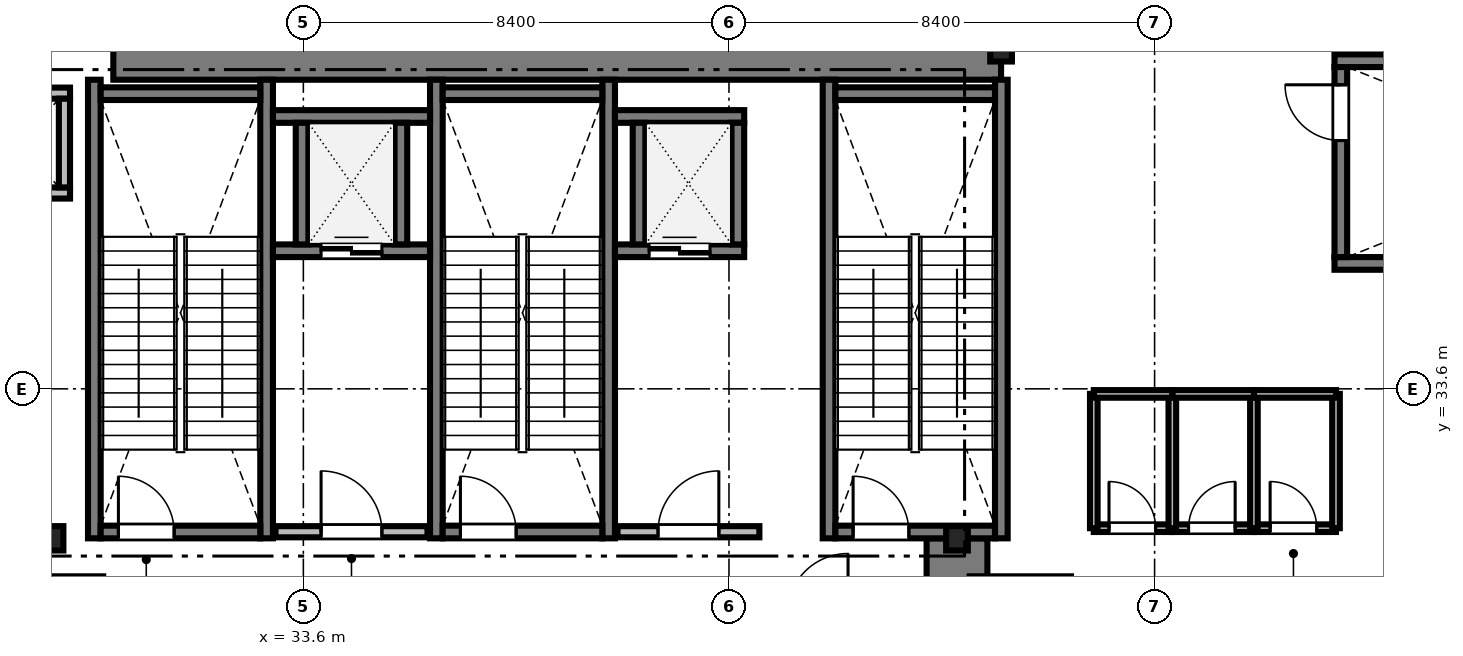
"""IFC4 building model, lengths in metres.
Left out: names, types, materials, properties, quantities, classifications, styles, units other than length and angle.
Written with IfcOpenShell. Run it as: python <this file> out.ifc"""

import sys

from ifc_helpers import new_model, si_unit, direction, frame, frame_2d, origin, origin_2d, place, context, subcontext, project, spatial, rectangle, i_section, extrude, source, transform, mapped, element, fill, save


model = new_model("IFC4")
c1 = context("Model", 3, precision=1e-05, world=origin(), true_north=direction((0.0, 1.0)))
c2 = subcontext(c1, "Body", "Model", "MODEL_VIEW")
j1 = project(units=[si_unit("LENGTHUNIT", "METRE"), si_unit("PLANEANGLEUNIT", "RADIAN")], contexts=[c1])
p1 = place(None, origin())
s1 = spatial("IfcSite", under=j1, at=p1, CompositionType="ELEMENT")
p2 = place(p1, origin())
s2 = spatial("IfcBuilding", under=s1, at=p2, CompositionType="ELEMENT")
p3 = place(p2, frame((0.0, 0.0, 11.4)))
s3 = spatial("IfcBuildingStorey", under=s2, at=p3, CompositionType="ELEMENT", Elevation=11.4)
m1 = source(origin(), c2, "Body", "SweptSolid", [
    extrude(rectangle(XDim=17.52, YDim=1.2, at=frame_2d((8.76, 0.0))), origin(), (0.0, 0.0, 1.0), 5.2),
])
p4 = place(p3, frame((29.85, 40.3, 0.0), z_axis=(0.0, 0.0, 1.0), x_axis=(1.0, 0.0, 0.0)))
e1 = element("IfcWall", 1, at=p4, inside=s3, PredefinedType="SHEAR", context=c2, shape_type="MappedRepresentation", body=[
    mapped(m1, transform((0.0, 0.0, 0.0), scale=1.0)),
])
m2 = source(origin(), c2, "Body", "SweptSolid", [
    extrude(rectangle(XDim=13.15, YDim=1.2, at=frame_2d((6.575, 0.0))), origin(), (0.0, 0.0, 1.0), 5.2),
])
p5 = place(p3, frame((46.5, 17.5, 0.0), z_axis=(0.0, 0.0, 1.0), x_axis=(0.0, 1.0, 0.0)))
e2 = element("IfcWall", 2, at=p5, inside=s3, PredefinedType="SHEAR", context=c2, shape_type="MappedRepresentation", body=[
    mapped(m2, transform((0.0, 0.0, 0.0), scale=1.0)),
])
m3 = source(origin(), c2, "Body", "SweptSolid", [
    extrude(i_section(OverallWidth=0.428, OverallDepth=0.481, WebThickness=0.04, FlangeThickness=0.063, FilletRadius=0.015, at=origin_2d()), origin(), (0.0, 0.0, 1.0), 5.2),
])
for number, where, z_axis, x_axis in (
    (3, (28.65, 30.65, 0.0), (0.0, 0.0, 1.0), (1.0, 0.0, 0.0)),
    (4, (46.5, 30.65, 0.0), (0.0, 0.0, 1.0), (1.0, 0.0, 0.0)),
    (5, (47.37, 40.3, 0.0), (0.0, 0.0, 1.0), (1.0, 0.0, 0.0)),
):
    element("IfcColumn", number, at=place(p3, frame(where, z_axis=z_axis, x_axis=x_axis)), inside=s3, PredefinedType="COLUMN", context=c2, shape_type="MappedRepresentation", body=[
        mapped(m3, transform((0.0, 0.0, 0.0), scale=1.0)),
    ])
m4 = source(origin(), c2, "Body", "SweptSolid", [
    extrude(rectangle(XDim=9.05, YDim=0.25, at=frame_2d((4.525, 0.0))), origin(), (0.0, 0.0, 1.0), 5.4),
])
for number, where, z_axis, x_axis in (
    (6, (29.475, 30.65, 0.0), (0.0, 0.0, 1.0), (0.0, 1.0, 0.0)),
    (7, (32.875, 30.65, 0.0), (0.0, 0.0, 1.0), (0.0, 1.0, 0.0)),
):
    element("IfcWall", number, at=place(p3, frame(where, z_axis=z_axis, x_axis=x_axis)), inside=s3, PredefinedType="SOLIDWALL", context=c2, shape_type="MappedRepresentation", body=[
        mapped(m4, transform((0.0, 0.0, 0.0), scale=1.0)),
    ])
m5 = source(origin(), c2, "Body", "SweptSolid", [
    extrude(rectangle(XDim=3.15, YDim=0.25, at=frame_2d((1.575, 0.0))), origin(), (0.0, 0.0, 1.0), 5.4),
])
p6 = place(p3, frame((29.6, 39.425, 0.0), z_axis=(0.0, 0.0, 1.0), x_axis=(1.0, 0.0, 0.0)))
e8 = element("IfcWall", 8, at=p6, inside=s3, PredefinedType="SOLIDWALL", context=c2, shape_type="MappedRepresentation", body=[
    mapped(m5, transform((0.0, 0.0, 0.0), scale=1.0)),
])
p7 = place(p3, frame((29.6, 30.775, 0.0), z_axis=(0.0, 0.0, 1.0), x_axis=(1.0, 0.0, 0.0)))
e9 = element("IfcWall", 9, at=p7, inside=s3, PredefinedType="SOLIDWALL", context=c2, shape_type="MappedRepresentation", body=[
    mapped(m5, transform((0.0, 0.0, 0.0), scale=1.0)),
])
m6 = source(origin(), c2, "Body", "SweptSolid", [
    extrude(rectangle(XDim=1.1, YDim=2.2, at=frame_2d((0.55, 1.1))), frame((0.0, 0.135, 0.0), z_axis=(0.0, -1.0, 0.0), x_axis=(1.0, 0.0, 0.0)), (0.0, 0.0, 1.0), 0.27),
])
p8 = place(p7, frame((0.35, 0.0, 0.0)))
e10 = element("IfcOpeningElement", 10, at=p8, cuts=e9, PredefinedType="OPENING", context=c2, shape_type="MappedRepresentation", body=[
    mapped(m6, transform((0.0, 0.0, 0.0), scale=1.0)),
])
for number, where, z_axis, x_axis in (
    (11, (36.225, 30.65, 0.0), (0.0, 0.0, 1.0), (0.0, 1.0, 0.0)),
    (12, (39.625, 30.65, 0.0), (0.0, 0.0, 1.0), (0.0, 1.0, 0.0)),
):
    element("IfcWall", number, at=place(p3, frame(where, z_axis=z_axis, x_axis=x_axis)), inside=s3, PredefinedType="SOLIDWALL", context=c2, shape_type="MappedRepresentation", body=[
        mapped(m4, transform((0.0, 0.0, 0.0), scale=1.0)),
    ])
p9 = place(p3, frame((36.35, 39.425, 0.0), z_axis=(0.0, 0.0, 1.0), x_axis=(1.0, 0.0, 0.0)))
e13 = element("IfcWall", 13, at=p9, inside=s3, PredefinedType="SOLIDWALL", context=c2, shape_type="MappedRepresentation", body=[
    mapped(m5, transform((0.0, 0.0, 0.0), scale=1.0)),
])
p10 = place(p3, frame((36.35, 30.775, 0.0), z_axis=(0.0, 0.0, 1.0), x_axis=(1.0, 0.0, 0.0)))
e14 = element("IfcWall", 14, at=p10, inside=s3, PredefinedType="SOLIDWALL", context=c2, shape_type="MappedRepresentation", body=[
    mapped(m5, transform((0.0, 0.0, 0.0), scale=1.0)),
])
p11 = place(p10, frame((0.35, 0.0, 0.0)))
e15 = element("IfcOpeningElement", 15, at=p11, cuts=e14, PredefinedType="OPENING", context=c2, shape_type="MappedRepresentation", body=[
    mapped(m6, transform((0.0, 0.0, 0.0), scale=1.0)),
])
for number, where, z_axis, x_axis in (
    (16, (43.975, 30.65, 0.0), (0.0, 0.0, 1.0), (0.0, 1.0, 0.0)),
    (17, (47.375, 30.65, 0.0), (0.0, 0.0, 1.0), (0.0, 1.0, 0.0)),
):
    element("IfcWall", number, at=place(p3, frame(where, z_axis=z_axis, x_axis=x_axis)), inside=s3, PredefinedType="SOLIDWALL", context=c2, shape_type="MappedRepresentation", body=[
        mapped(m4, transform((0.0, 0.0, 0.0), scale=1.0)),
    ])
p12 = place(p3, frame((44.1, 39.425, 0.0), z_axis=(0.0, 0.0, 1.0), x_axis=(1.0, 0.0, 0.0)))
e18 = element("IfcWall", 18, at=p12, inside=s3, PredefinedType="SOLIDWALL", context=c2, shape_type="MappedRepresentation", body=[
    mapped(m5, transform((0.0, 0.0, 0.0), scale=1.0)),
])
p13 = place(p3, frame((44.1, 30.775, 0.0), z_axis=(0.0, 0.0, 1.0), x_axis=(1.0, 0.0, 0.0)))
e19 = element("IfcWall", 19, at=p13, inside=s3, PredefinedType="SOLIDWALL", context=c2, shape_type="MappedRepresentation", body=[
    mapped(m5, transform((0.0, 0.0, 0.0), scale=1.0)),
])
p14 = place(p13, frame((0.35, 0.0, 0.0)))
e20 = element("IfcOpeningElement", 20, at=p14, cuts=e19, PredefinedType="OPENING", context=c2, shape_type="MappedRepresentation", body=[
    mapped(m6, transform((0.0, 0.0, 0.0), scale=1.0)),
])
m7 = source(origin(), c2, "Body", "SweptSolid", [
    extrude(rectangle(XDim=9.9, YDim=0.25, at=frame_2d((4.95, 0.0))), origin(), (0.0, 0.0, 1.0), 5.4),
])
for number, where, z_axis, x_axis in (
    (21, (53.95, 36.075, 0.0), (0.0, 0.0, 1.0), (1.0, 0.0, 0.0)),
    (22, (53.95, 40.075, 0.0), (0.0, 0.0, 1.0), (1.0, 0.0, 0.0)),
):
    element("IfcWall", number, at=place(p3, frame(where, z_axis=z_axis, x_axis=x_axis)), inside=s3, PredefinedType="SOLIDWALL", context=c2, shape_type="MappedRepresentation", body=[
        mapped(m7, transform((0.0, 0.0, 0.0), scale=1.0)),
    ])
m8 = source(origin(), c2, "Body", "SweptSolid", [
    extrude(rectangle(XDim=3.75, YDim=0.25, at=frame_2d((1.875, 0.0))), origin(), (0.0, 0.0, 1.0), 5.4),
])
p15 = place(p3, frame((54.075, 36.2, 0.0), z_axis=(0.0, 0.0, 1.0), x_axis=(0.0, 1.0, 0.0)))
e23 = element("IfcWall", 23, at=p15, inside=s3, PredefinedType="SOLIDWALL", context=c2, shape_type="MappedRepresentation", body=[
    mapped(m8, transform((0.0, 0.0, 0.0), scale=1.0)),
])
p16 = place(p15, frame((2.3, 0.0, 0.0)))
e24 = element("IfcOpeningElement", 24, at=p16, cuts=e23, PredefinedType="OPENING", context=c2, shape_type="MappedRepresentation", body=[
    mapped(m6, transform((0.0, 0.0, 0.0), scale=1.0)),
])
m9 = source(origin(), c2, "Body", "SweptSolid", [
    extrude(rectangle(XDim=3.0, YDim=0.22, at=frame_2d((1.5, 0.0))), origin(), (0.0, 0.0, 1.0), 5.2),
])
p17 = place(p3, frame((33.05, 30.78, 0.0), z_axis=(0.0, 0.0, 1.0), x_axis=(1.0, 0.0, 0.0)))
e25 = element("IfcWall", 25, at=p17, inside=s3, PredefinedType="SOLIDWALL", context=c2, shape_type="MappedRepresentation", body=[
    mapped(m9, transform((0.0, 0.0, 0.0), scale=1.0)),
])
m10 = source(origin(), c2, "Body", "SweptSolid", [
    extrude(rectangle(XDim=1.2, YDim=2.2, at=frame_2d((0.6, 1.1))), frame((0.0, 0.12, 0.0), z_axis=(0.0, -1.0, 0.0), x_axis=(1.0, 0.0, 0.0)), (0.0, 0.0, 1.0), 0.24),
])
p18 = place(p17, frame((0.9, 0.0, 0.0)))
e26 = element("IfcOpeningElement", 26, at=p18, cuts=e25, PredefinedType="OPENING", context=c2, shape_type="MappedRepresentation", body=[
    mapped(m10, transform((0.0, 0.0, 0.0), scale=1.0)),
])
m11 = source(origin(), c2, "Body", "SweptSolid", [
    extrude(rectangle(XDim=2.8, YDim=0.22, at=frame_2d((1.4, 0.0))), origin(), (0.0, 0.0, 1.0), 5.2),
])
p19 = place(p3, frame((39.8, 30.78, 0.0), z_axis=(0.0, 0.0, 1.0), x_axis=(1.0, 0.0, 0.0)))
e27 = element("IfcWall", 27, at=p19, inside=s3, PredefinedType="SOLIDWALL", context=c2, shape_type="MappedRepresentation", body=[
    mapped(m11, transform((0.0, 0.0, 0.0), scale=1.0)),
])
p20 = place(p19, frame((0.8, 0.0, 0.0)))
e28 = element("IfcOpeningElement", 28, at=p20, cuts=e27, PredefinedType="OPENING", context=c2, shape_type="MappedRepresentation", body=[
    mapped(m10, transform((0.0, 0.0, 0.0), scale=1.0)),
])
m12 = source(origin(), c2, "Body", "SweptSolid", [
    extrude(rectangle(XDim=1.99, YDim=0.22, at=frame_2d((0.995, 0.0))), origin(), (0.0, 0.0, 1.0), 5.2),
])
for number, where, z_axis, x_axis in (
    (29, (27.005, 37.465, 0.0), (0.0, 0.0, 1.0), (1.0, 0.0, 0.0)),
    (30, (27.005, 39.435, 0.0), (0.0, 0.0, 1.0), (1.0, 0.0, 0.0)),
):
    element("IfcWall", number, at=place(p3, frame(where, z_axis=z_axis, x_axis=x_axis)), inside=s3, PredefinedType="SOLIDWALL", context=c2, shape_type="MappedRepresentation", body=[
        mapped(m12, transform((0.0, 0.0, 0.0), scale=1.0)),
    ])
m13 = source(origin(), c2, "Body", "SweptSolid", [
    extrude(rectangle(XDim=1.75, YDim=0.22, at=frame_2d((0.875, 0.0))), origin(), (0.0, 0.0, 1.0), 5.2),
])
p21 = place(p3, frame((28.885, 37.575, 0.0), z_axis=(0.0, 0.0, 1.0), x_axis=(0.0, 1.0, 0.0)))
e31 = element("IfcWall", 31, at=p21, inside=s3, PredefinedType="SOLIDWALL", context=c2, shape_type="MappedRepresentation", body=[
    mapped(m13, transform((0.0, 0.0, 0.0), scale=1.0)),
])
m14 = source(origin(), c2, "Body", "SweptSolid", [
    extrude(rectangle(XDim=3.1, YDim=0.25, at=frame_2d((1.55, 0.0))), origin(), (0.0, 0.0, 1.0), 5.2),
])
p22 = place(p3, frame((33.0, 36.325, 0.0), z_axis=(0.0, 0.0, 1.0), x_axis=(1.0, 0.0, 0.0)))
e32 = element("IfcWall", 32, at=p22, inside=s3, PredefinedType="SOLIDWALL", context=c2, shape_type="MappedRepresentation", body=[
    mapped(m14, transform((0.0, 0.0, 0.0), scale=1.0)),
])
m15 = source(origin(), c2, "Body", "SweptSolid", [
    extrude(rectangle(XDim=1.2, YDim=2.25, at=frame_2d((0.6, 1.125))), frame((0.0, 0.135, 0.0), z_axis=(0.0, -1.0, 0.0), x_axis=(1.0, 0.0, 0.0)), (0.0, 0.0, 1.0), 0.27),
])
p23 = place(p22, frame((0.95, 0.0, 0.0)))
e33 = element("IfcOpeningElement", 33, at=p23, cuts=e32, PredefinedType="OPENING", context=c2, shape_type="MappedRepresentation", body=[
    mapped(m15, transform((0.0, 0.0, 0.0), scale=1.0)),
])
p24 = place(p3, frame((33.0, 38.975, 0.0), z_axis=(0.0, 0.0, 1.0), x_axis=(1.0, 0.0, 0.0)))
e34 = element("IfcWall", 34, at=p24, inside=s3, PredefinedType="SOLIDWALL", context=c2, shape_type="MappedRepresentation", body=[
    mapped(m14, transform((0.0, 0.0, 0.0), scale=1.0)),
])
m16 = source(origin(), c2, "Body", "SweptSolid", [
    extrude(rectangle(XDim=2.4, YDim=0.25, at=frame_2d((1.2, 0.0))), origin(), (0.0, 0.0, 1.0), 5.2),
])
for number, where, z_axis, x_axis in (
    (35, (33.575, 36.45, 0.0), (0.0, 0.0, 1.0), (0.0, 1.0, 0.0)),
    (36, (35.525, 36.45, 0.0), (0.0, 0.0, 1.0), (0.0, 1.0, 0.0)),
):
    element("IfcWall", number, at=place(p3, frame(where, z_axis=z_axis, x_axis=x_axis)), inside=s3, PredefinedType="SOLIDWALL", context=c2, shape_type="MappedRepresentation", body=[
        mapped(m16, transform((0.0, 0.0, 0.0), scale=1.0)),
    ])
m17 = source(origin(), c2, "Body", "SweptSolid", [
    extrude(rectangle(XDim=2.55, YDim=0.25, at=frame_2d((1.275, 0.0))), origin(), (0.0, 0.0, 1.0), 5.2),
])
p25 = place(p3, frame((39.75, 36.325, 0.0), z_axis=(0.0, 0.0, 1.0), x_axis=(1.0, 0.0, 0.0)))
e37 = element("IfcWall", 37, at=p25, inside=s3, PredefinedType="SOLIDWALL", context=c2, shape_type="MappedRepresentation", body=[
    mapped(m17, transform((0.0, 0.0, 0.0), scale=1.0)),
])
p26 = place(p25, frame((0.675, 0.0, 0.0)))
e38 = element("IfcOpeningElement", 38, at=p26, cuts=e37, PredefinedType="OPENING", context=c2, shape_type="MappedRepresentation", body=[
    mapped(m15, transform((0.0, 0.0, 0.0), scale=1.0)),
])
p27 = place(p3, frame((39.75, 38.975, 0.0), z_axis=(0.0, 0.0, 1.0), x_axis=(1.0, 0.0, 0.0)))
e39 = element("IfcWall", 39, at=p27, inside=s3, PredefinedType="SOLIDWALL", context=c2, shape_type="MappedRepresentation", body=[
    mapped(m17, transform((0.0, 0.0, 0.0), scale=1.0)),
])
for number, where, z_axis, x_axis in (
    (40, (40.225, 36.45, 0.0), (0.0, 0.0, 1.0), (0.0, 1.0, 0.0)),
    (41, (42.175, 36.45, 0.0), (0.0, 0.0, 1.0), (0.0, 1.0, 0.0)),
):
    element("IfcWall", number, at=place(p3, frame(where, z_axis=z_axis, x_axis=x_axis)), inside=s3, PredefinedType="SOLIDWALL", context=c2, shape_type="MappedRepresentation", body=[
        mapped(m16, transform((0.0, 0.0, 0.0), scale=1.0)),
    ])
m18 = source(origin(), c2, "Body", "SweptSolid", [
    extrude(rectangle(XDim=1.62, YDim=0.15, at=frame_2d((0.81, 0.0))), origin(), (0.0, 0.0, 1.0), 5.2),
])
p28 = place(p3, frame((52.36, 30.85, 0.0), z_axis=(0.0, 0.0, 1.0), x_axis=(1.0, 0.0, 0.0)))
e42 = element("IfcWall", 42, at=p28, inside=s3, PredefinedType="PARTITIONING", context=c2, shape_type="MappedRepresentation", body=[
    mapped(m18, transform((0.0, 0.0, 0.0), scale=1.0)),
])
m19 = source(origin(), c2, "Body", "SweptSolid", [
    extrude(rectangle(XDim=0.92, YDim=2.1, at=frame_2d((0.46, 1.05))), frame((0.0, 0.085, 0.0), z_axis=(0.0, -1.0, 0.0), x_axis=(1.0, 0.0, 0.0)), (0.0, 0.0, 1.0), 0.17),
])
p29 = place(p28, frame((0.32, 0.0, 0.0)))
e43 = element("IfcOpeningElement", 43, at=p29, cuts=e42, PredefinedType="OPENING", context=c2, shape_type="MappedRepresentation", body=[
    mapped(m19, transform((0.0, 0.0, 0.0), scale=1.0)),
])
m20 = source(origin(), c2, "Body", "SweptSolid", [
    extrude(rectangle(XDim=1.61, YDim=0.15, at=frame_2d((0.805, 0.0))), origin(), (0.0, 0.0, 1.0), 5.2),
])
p30 = place(p3, frame((50.75, 30.85, 0.0), z_axis=(0.0, 0.0, 1.0), x_axis=(1.0, 0.0, 0.0)))
e44 = element("IfcWall", 44, at=p30, inside=s3, PredefinedType="PARTITIONING", context=c2, shape_type="MappedRepresentation", body=[
    mapped(m20, transform((0.0, 0.0, 0.0), scale=1.0)),
])
p31 = place(p30, frame((0.32, 0.0, 0.0)))
e45 = element("IfcOpeningElement", 45, at=p31, cuts=e44, PredefinedType="OPENING", context=c2, shape_type="MappedRepresentation", body=[
    mapped(m19, transform((0.0, 0.0, 0.0), scale=1.0)),
])
m21 = source(origin(), c2, "Body", "SweptSolid", [
    extrude(rectangle(XDim=1.55, YDim=0.15, at=frame_2d((0.775, 0.0))), origin(), (0.0, 0.0, 1.0), 5.2),
])
p32 = place(p3, frame((49.2, 30.85, 0.0), z_axis=(0.0, 0.0, 1.0), x_axis=(1.0, 0.0, 0.0)))
e46 = element("IfcWall", 46, at=p32, inside=s3, PredefinedType="PARTITIONING", context=c2, shape_type="MappedRepresentation", body=[
    mapped(m21, transform((0.0, 0.0, 0.0), scale=1.0)),
])
p33 = place(p32, frame((0.3, 0.0, 0.0)))
e47 = element("IfcOpeningElement", 47, at=p33, cuts=e46, PredefinedType="OPENING", context=c2, shape_type="MappedRepresentation", body=[
    mapped(m19, transform((0.0, 0.0, 0.0), scale=1.0)),
])
m22 = source(origin(), c2, "Body", "SweptSolid", [
    extrude(rectangle(XDim=2.65, YDim=0.15, at=frame_2d((1.325, 0.0))), origin(), (0.0, 0.0, 1.0), 5.2),
])
for number, where, z_axis, x_axis in (
    (48, (49.2, 30.85, 0.0), (0.0, 0.0, 1.0), (0.0, 1.0, 0.0)),
    (49, (50.75, 30.85, 0.0), (0.0, 0.0, 1.0), (0.0, 1.0, 0.0)),
    (50, (52.36, 30.85, 0.0), (0.0, 0.0, 1.0), (0.0, 1.0, 0.0)),
    (51, (53.98, 30.85, 0.0), (0.0, 0.0, 1.0), (0.0, 1.0, 0.0)),
):
    element("IfcWall", number, at=place(p3, frame(where, z_axis=z_axis, x_axis=x_axis)), inside=s3, PredefinedType="PARTITIONING", context=c2, shape_type="MappedRepresentation", body=[
        mapped(m22, transform((0.0, 0.0, 0.0), scale=1.0)),
    ])
p34 = place(p3, frame((52.36, 33.5, 0.0), z_axis=(0.0, 0.0, 1.0), x_axis=(1.0, 0.0, 0.0)))
e52 = element("IfcWall", 52, at=p34, inside=s3, PredefinedType="PARTITIONING", context=c2, shape_type="MappedRepresentation", body=[
    mapped(m18, transform((0.0, 0.0, 0.0), scale=1.0)),
])
p35 = place(p3, frame((50.75, 33.5, 0.0), z_axis=(0.0, 0.0, 1.0), x_axis=(1.0, 0.0, 0.0)))
e53 = element("IfcWall", 53, at=p35, inside=s3, PredefinedType="PARTITIONING", context=c2, shape_type="MappedRepresentation", body=[
    mapped(m20, transform((0.0, 0.0, 0.0), scale=1.0)),
])
p36 = place(p3, frame((49.2, 33.5, 0.0), z_axis=(0.0, 0.0, 1.0), x_axis=(1.0, 0.0, 0.0)))
e54 = element("IfcWall", 54, at=p36, inside=s3, PredefinedType="PARTITIONING", context=c2, shape_type="MappedRepresentation", body=[
    mapped(m21, transform((0.0, 0.0, 0.0), scale=1.0)),
])
m23 = source(origin(), c2, "Body", "SweptSolid", [
    extrude(rectangle(XDim=1.1, YDim=2.2, at=frame_2d((0.55, 1.1))), frame((0.0, 0.025, 0.0), z_axis=(0.0, -1.0, 0.0), x_axis=(1.0, 0.0, 0.0)), (0.0, 0.0, 1.0), 0.05),
])
p37 = place(p8, origin())
e55 = element("IfcDoor", 55, at=p37, inside=s3, OperationType="SINGLE_SWING_LEFT", PredefinedType="DOOR", context=c2, shape_type="MappedRepresentation", body=[
    mapped(m23, transform((0.0, 0.0, 0.0), scale=1.0)),
])
fill(e10, e55)
p38 = place(p11, origin())
e56 = element("IfcDoor", 56, at=p38, inside=s3, OperationType="SINGLE_SWING_LEFT", PredefinedType="DOOR", context=c2, shape_type="MappedRepresentation", body=[
    mapped(m23, transform((0.0, 0.0, 0.0), scale=1.0)),
])
fill(e15, e56)
p39 = place(p14, origin())
e57 = element("IfcDoor", 57, at=p39, inside=s3, OperationType="SINGLE_SWING_LEFT", PredefinedType="DOOR", context=c2, shape_type="MappedRepresentation", body=[
    mapped(m23, transform((0.0, 0.0, 0.0), scale=1.0)),
])
fill(e20, e57)
p40 = place(p16, origin())
e58 = element("IfcDoor", 58, at=p40, inside=s3, OperationType="SINGLE_SWING_RIGHT", PredefinedType="DOOR", context=c2, shape_type="MappedRepresentation", body=[
    mapped(m23, transform((0.0, 0.0, 0.0), scale=1.0)),
])
fill(e24, e58)
m24 = source(origin(), c2, "Body", "SweptSolid", [
    extrude(rectangle(XDim=1.2, YDim=2.2, at=frame_2d((0.6, 1.1))), frame((0.0, 0.025, 0.0), z_axis=(0.0, -1.0, 0.0), x_axis=(1.0, 0.0, 0.0)), (0.0, 0.0, 1.0), 0.05),
])
p41 = place(p18, origin())
e59 = element("IfcDoor", 59, at=p41, inside=s3, OperationType="SINGLE_SWING_LEFT", PredefinedType="DOOR", context=c2, shape_type="MappedRepresentation", body=[
    mapped(m24, transform((0.0, 0.0, 0.0), scale=1.0)),
])
fill(e26, e59)
p42 = place(p20, origin())
e60 = element("IfcDoor", 60, at=p42, inside=s3, OperationType="SINGLE_SWING_RIGHT", PredefinedType="DOOR", context=c2, shape_type="MappedRepresentation", body=[
    mapped(m24, transform((0.0, 0.0, 0.0), scale=1.0)),
])
fill(e28, e60)
m25 = source(origin(), c2, "Body", "SweptSolid", [
    extrude(rectangle(XDim=1.2, YDim=2.25, at=frame_2d((0.6, 1.125))), frame((0.0, 0.025, 0.0), z_axis=(0.0, -1.0, 0.0), x_axis=(1.0, 0.0, 0.0)), (0.0, 0.0, 1.0), 0.05),
])
p43 = place(p23, origin())
e61 = element("IfcDoor", 61, at=p43, inside=s3, OperationType="DOUBLE_DOOR_SLIDING", PredefinedType="DOOR", context=c2, shape_type="MappedRepresentation", body=[
    mapped(m25, transform((0.0, 0.0, 0.0), scale=1.0)),
])
fill(e33, e61)
p44 = place(p26, origin())
e62 = element("IfcDoor", 62, at=p44, inside=s3, OperationType="DOUBLE_DOOR_SLIDING", PredefinedType="DOOR", context=c2, shape_type="MappedRepresentation", body=[
    mapped(m25, transform((0.0, 0.0, 0.0), scale=1.0)),
])
fill(e38, e62)
m26 = source(origin(), c2, "Body", "SweptSolid", [
    extrude(rectangle(XDim=0.92, YDim=2.1, at=frame_2d((0.46, 1.05))), frame((0.0, 0.025, 0.0), z_axis=(0.0, -1.0, 0.0), x_axis=(1.0, 0.0, 0.0)), (0.0, 0.0, 1.0), 0.05),
])
p45 = place(p29, origin())
e63 = element("IfcDoor", 63, at=p45, inside=s3, OperationType="SINGLE_SWING_LEFT", PredefinedType="DOOR", context=c2, shape_type="MappedRepresentation", body=[
    mapped(m26, transform((0.0, 0.0, 0.0), scale=1.0)),
])
fill(e43, e63)
p46 = place(p31, origin())
e64 = element("IfcDoor", 64, at=p46, inside=s3, OperationType="SINGLE_SWING_RIGHT", PredefinedType="DOOR", context=c2, shape_type="MappedRepresentation", body=[
    mapped(m26, transform((0.0, 0.0, 0.0), scale=1.0)),
])
fill(e45, e64)
p47 = place(p33, origin())
e65 = element("IfcDoor", 65, at=p47, inside=s3, OperationType="SINGLE_SWING_LEFT", PredefinedType="DOOR", context=c2, shape_type="MappedRepresentation", body=[
    mapped(m26, transform((0.0, 0.0, 0.0), scale=1.0)),
])
fill(e47, e65)
save(model, sys.argv[1])
